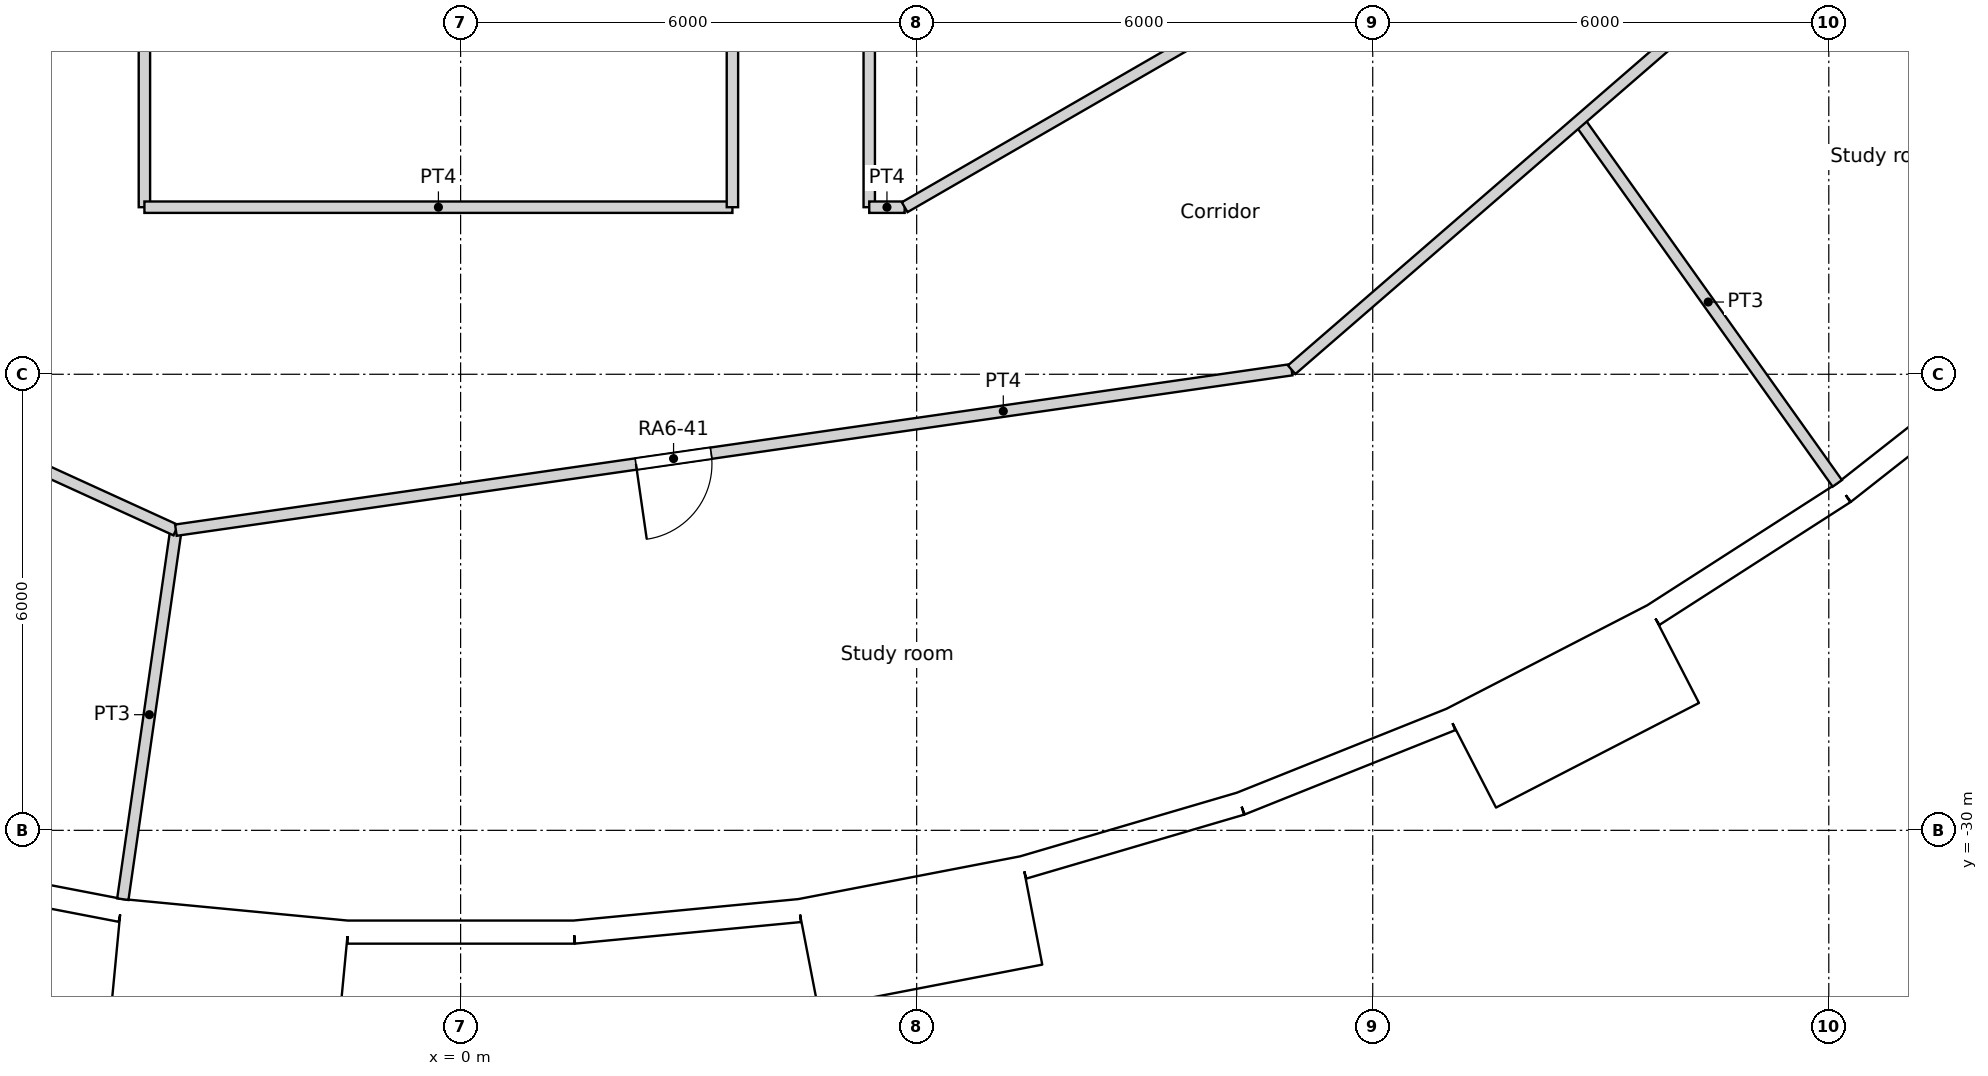
"""IFC4 building model, lengths in metres.
Left out: names, types, materials, properties, quantities, classifications, styles, units other than length and angle.
Written with IfcOpenShell. Run it as: python <this file> out.ifc"""

import sys

from ifc_helpers import new_model, si_unit, direction, frame, frame_2d, origin, origin_2d, place, context, subcontext, project, spatial, rectangle, circle, extrude, element, fill, save


model = new_model("IFC4")
c1 = context("Model", 3, precision=1e-05, world=origin(), true_north=direction((0.0, 1.0)))
c2 = subcontext(c1, "Body", "Model", "MODEL_VIEW")
j1 = project(units=[si_unit("LENGTHUNIT", "METRE"), si_unit("PLANEANGLEUNIT", "RADIAN")], contexts=[c1])
p1 = place(None, origin())
s1 = spatial("IfcSite", under=j1, at=p1, CompositionType="ELEMENT")
p2 = place(p1, origin())
s2 = spatial("IfcBuilding", under=s1, at=p2, CompositionType="ELEMENT")
p3 = place(p2, frame((0.0, 0.0, 82.2)))
s3 = spatial("IfcBuildingStorey", under=s2, at=p3, CompositionType="ELEMENT", Elevation=82.2)
for number, where, z_axis, x_axis in (
    (1, (-4.309, -29.966, 0.0), (0.0, 0.0, 1.0), (1.0, 0.0, 0.0)),
    (2, (1.44, -30.24, 0.0), (0.0, 0.0, 1.0), (1.0, 0.0, 0.0)),
    (3, (7.137, -29.421, 0.0), (0.0, 0.0, 1.0), (1.0, 0.0, 0.0)),
    (4, (12.576, -27.539, 0.0), (0.0, 0.0, 1.0), (1.0, 0.0, 0.0)),
    (5, (17.561, -24.661, 0.0), (0.0, 0.0, 1.0), (1.0, 0.0, 0.0)),
):
    element("IfcColumn", number, at=place(p3, frame(where, z_axis=z_axis, x_axis=x_axis)), inside=s3, PredefinedType="COLUMN", context=c2, shape_type="SweptSolid", body=[
        extrude(circle(Radius=0.6, at=origin_2d()), origin(), (0.0, 0.0, 1.0), 3.6),
    ])
for number, where, z_axis, x_axis in (
    (6, (-1.427, -24.506, 0.0), (0.0, 0.0, 1.0), (1.0, 0.0, 0.0)),
    (7, (4.263, -24.175, 0.0), (0.0, 0.0, 1.0), (1.0, 0.0, 0.0)),
    (8, (9.723, -22.54, 0.0), (0.0, 0.0, 1.0), (1.0, 0.0, 0.0)),
    (9, (14.659, -19.69, 0.0), (0.0, 0.0, 1.0), (1.0, 0.0, 0.0)),
):
    element("IfcColumn", number, at=place(p3, frame(where, z_axis=z_axis, x_axis=x_axis)), inside=s3, PredefinedType="COLUMN", context=c2, shape_type="SweptSolid", body=[
        extrude(circle(Radius=0.65, at=origin_2d()), origin(), (0.0, 0.0, 1.0), 3.6),
    ])
p4 = place(p3, frame((-7.397, -30.49, 0.0), z_axis=(0.0, 0.0, 1.0), x_axis=(0.981924535406, -0.189272836848, 0.0)))
e10 = element("IfcWall", 10, at=p4, inside=s3, PredefinedType="SOLIDWALL", context=c2, shape_type="SweptSolid", body=[
    extrude(rectangle(XDim=2.98, YDim=0.3, at=frame_2d((1.49, 0.0))), origin(), (0.0, 0.0, 1.0), 3.15),
])
p5 = place(p4, frame((1.49, 0.0, 1.55)))
e11 = element("IfcOpeningElement", 11, at=p5, cuts=e10, PredefinedType="OPENING", context=c2, shape_type="SweptSolid", body=[
    extrude(circle(Radius=0.9, at=origin_2d()), frame((0.0, 0.16, 0.0), z_axis=(0.0, -1.0, 0.0), x_axis=(1.0, 0.0, 0.0)), (0.0, 0.0, 1.0), 0.32),
])
p6 = place(p3, frame((-4.527, -31.627, -0.45), z_axis=(0.0, 0.0, 1.0), x_axis=(0.995472768558, -0.09504718333, 0.0)))
e12 = element("IfcWall", 12, at=p6, inside=s3, PredefinedType="ELEMENTEDWALL", context=c2, shape_type="SweptSolid", body=[
    extrude(rectangle(XDim=3.0, YDim=1.45, at=frame_2d((1.5, 0.0))), origin(), (0.0, 0.0, 1.0), 3.6),
])
p7 = place(p6, frame((1.5, 0.0, 2.0)))
e13 = element("IfcOpeningElement", 13, at=p7, cuts=e12, PredefinedType="OPENING", context=c2, shape_type="SweptSolid", body=[
    extrude(circle(Radius=0.9, at=origin_2d()), frame((0.0, 0.735, 0.0), z_axis=(0.0, -1.0, 0.0), x_axis=(1.0, 0.0, 0.0)), (0.0, 0.0, 1.0), 1.47),
])
p8 = place(p3, frame((-1.487, -31.339, 0.0), z_axis=(0.0, 0.0, 1.0), x_axis=(1.0, 0.0, 0.0)))
e14 = element("IfcWall", 14, at=p8, inside=s3, PredefinedType="SOLIDWALL", context=c2, shape_type="SweptSolid", body=[
    extrude(rectangle(XDim=2.98, YDim=0.3, at=frame_2d((1.49, 0.0))), origin(), (0.0, 0.0, 1.0), 3.15),
])
p9 = place(p8, frame((1.49, 0.0, 1.55)))
e15 = element("IfcOpeningElement", 15, at=p9, cuts=e14, PredefinedType="OPENING", context=c2, shape_type="SweptSolid", body=[
    extrude(circle(Radius=0.9, at=origin_2d()), frame((0.0, 0.16, 0.0), z_axis=(0.0, -1.0, 0.0), x_axis=(1.0, 0.0, 0.0)), (0.0, 0.0, 1.0), 0.32),
])
p10 = place(p3, frame((1.493, -31.339, 0.0), z_axis=(0.0, 0.0, 1.0), x_axis=(0.995472611385, 0.095048829468, 0.0)))
e16 = element("IfcWall", 16, at=p10, inside=s3, PredefinedType="SOLIDWALL", context=c2, shape_type="SweptSolid", body=[
    extrude(rectangle(XDim=2.979, YDim=0.3, at=frame_2d((1.49, 0.0))), origin(), (0.0, 0.0, 1.0), 3.15),
])
p11 = place(p10, frame((1.49, 0.0, 1.55)))
e17 = element("IfcOpeningElement", 17, at=p11, cuts=e16, PredefinedType="OPENING", context=c2, shape_type="SweptSolid", body=[
    extrude(circle(Radius=0.9, at=origin_2d()), frame((0.0, 0.16, 0.0), z_axis=(0.0, -1.0, 0.0), x_axis=(1.0, 0.0, 0.0)), (0.0, 0.0, 1.0), 0.32),
])
p12 = place(p3, frame((4.567, -31.621, -0.45), z_axis=(0.0, 0.0, 1.0), x_axis=(0.981921602273, 0.189288052949, 0.0)))
e18 = element("IfcWall", 18, at=p12, inside=s3, PredefinedType="ELEMENTEDWALL", context=c2, shape_type="SweptSolid", body=[
    extrude(rectangle(XDim=3.0, YDim=1.45, at=frame_2d((1.5, 0.0))), origin(), (0.0, 0.0, 1.0), 3.6),
])
p13 = place(p12, frame((1.5, 0.0, 2.0)))
e19 = element("IfcOpeningElement", 19, at=p13, cuts=e18, PredefinedType="OPENING", context=c2, shape_type="SweptSolid", body=[
    extrude(circle(Radius=0.9, at=origin_2d()), frame((0.0, 0.735, 0.0), z_axis=(0.0, -1.0, 0.0), x_axis=(1.0, 0.0, 0.0)), (0.0, 0.0, 1.0), 1.47),
])
p14 = place(p3, frame((7.403, -30.488, 0.0), z_axis=(0.0, 0.0, 1.0), x_axis=(0.959501085144, 0.281704930036, 0.0)))
e20 = element("IfcWall", 20, at=p14, inside=s3, PredefinedType="SOLIDWALL", context=c2, shape_type="SweptSolid", body=[
    extrude(rectangle(XDim=2.979, YDim=0.3, at=frame_2d((1.49, 0.0))), origin(), (0.0, 0.0, 1.0), 3.15),
])
p15 = place(p14, frame((1.49, 0.0, 1.55)))
e21 = element("IfcOpeningElement", 21, at=p15, cuts=e20, PredefinedType="OPENING", context=c2, shape_type="SweptSolid", body=[
    extrude(circle(Radius=0.9, at=origin_2d()), frame((0.0, 0.16, 0.0), z_axis=(0.0, -1.0, 0.0), x_axis=(1.0, 0.0, 0.0)), (0.0, 0.0, 1.0), 0.32),
])
p16 = place(p3, frame((10.261, -29.649, 0.0), z_axis=(0.0, 0.0, 1.0), x_axis=(0.928374947, 0.371644935098, 0.0)))
e22 = element("IfcWall", 22, at=p16, inside=s3, PredefinedType="SOLIDWALL", context=c2, shape_type="SweptSolid", body=[
    extrude(rectangle(XDim=2.98, YDim=0.3, at=frame_2d((1.49, 0.0))), origin(), (0.0, 0.0, 1.0), 3.15),
])
p17 = place(p16, frame((1.49, 0.0, 1.55)))
e23 = element("IfcOpeningElement", 23, at=p17, cuts=e22, PredefinedType="OPENING", context=c2, shape_type="SweptSolid", body=[
    extrude(circle(Radius=0.9, at=origin_2d()), frame((0.0, 0.16, 0.0), z_axis=(0.0, -1.0, 0.0), x_axis=(1.0, 0.0, 0.0)), (0.0, 0.0, 1.0), 0.32),
])
p18 = place(p3, frame((13.291, -29.053, -0.45), z_axis=(0.0, 0.0, 1.0), x_axis=(0.888858064689, 0.458182650083, 0.0)))
e24 = element("IfcWall", 24, at=p18, inside=s3, PredefinedType="ELEMENTEDWALL", context=c2, shape_type="SweptSolid", body=[
    extrude(rectangle(XDim=3.0, YDim=1.45, at=frame_2d((1.5, 0.0))), origin(), (0.0, 0.0, 1.0), 3.6),
])
p19 = place(p18, frame((1.5, 0.0, 2.0)))
e25 = element("IfcOpeningElement", 25, at=p19, cuts=e24, PredefinedType="OPENING", context=c2, shape_type="SweptSolid", body=[
    extrude(circle(Radius=0.9, at=origin_2d()), frame((0.0, 0.735, 0.0), z_axis=(0.0, -1.0, 0.0), x_axis=(1.0, 0.0, 0.0)), (0.0, 0.0, 1.0), 1.47),
])
p20 = place(p3, frame((15.692, -27.168, 0.0), z_axis=(0.0, 0.0, 1.0), x_axis=(0.841260995538, 0.54062920508, 0.0)))
e26 = element("IfcWall", 26, at=p20, inside=s3, PredefinedType="SOLIDWALL", context=c2, shape_type="SweptSolid", body=[
    extrude(rectangle(XDim=2.979, YDim=0.3, at=frame_2d((1.49, 0.0))), origin(), (0.0, 0.0, 1.0), 3.15),
])
p21 = place(p20, frame((1.49, 0.0, 1.55)))
e27 = element("IfcOpeningElement", 27, at=p21, cuts=e26, PredefinedType="OPENING", context=c2, shape_type="SweptSolid", body=[
    extrude(circle(Radius=0.9, at=origin_2d()), frame((0.0, 0.16, 0.0), z_axis=(0.0, -1.0, 0.0), x_axis=(1.0, 0.0, 0.0)), (0.0, 0.0, 1.0), 0.32),
])
p22 = place(p3, frame((18.199, -25.557, 0.0), z_axis=(0.0, 0.0, 1.0), x_axis=(0.786053834673, 0.618158045322, 0.0)))
e28 = element("IfcWall", 28, at=p22, inside=s3, PredefinedType="SOLIDWALL", context=c2, shape_type="SweptSolid", body=[
    extrude(rectangle(XDim=2.979, YDim=0.3, at=frame_2d((1.49, 0.0))), origin(), (0.0, 0.0, 1.0), 3.15),
])
p23 = place(p22, frame((1.49, 0.0, 1.55)))
e29 = element("IfcOpeningElement", 29, at=p23, cuts=e28, PredefinedType="OPENING", context=c2, shape_type="SweptSolid", body=[
    extrude(circle(Radius=0.9, at=origin_2d()), frame((0.0, 0.16, 0.0), z_axis=(0.0, -1.0, 0.0), x_axis=(1.0, 0.0, 0.0)), (0.0, 0.0, 1.0), 0.32),
])
p24 = place(p3, frame((10.933, -23.94, 0.0), z_axis=(0.0, 0.0, 1.0), x_axis=(0.755770011705, 0.654837147242, 0.0)))
e30 = element("IfcWall", 30, at=p24, inside=s3, PredefinedType="PARTITIONING", context=c2, shape_type="SweptSolid", body=[
    extrude(rectangle(XDim=14.83, YDim=0.15, at=frame_2d((7.415, 0.0))), origin(), (0.0, 0.0, 1.0), 3.15),
])
p25 = place(p3, frame((-4.16, -21.802, 0.0), z_axis=(0.0, 0.0, 1.0), x_axis=(0.0, 1.0, 0.0)))
e31 = element("IfcWall", 31, at=p25, inside=s3, PredefinedType="PARTITIONING", context=c2, shape_type="SweptSolid", body=[
    extrude(rectangle(XDim=10.002, YDim=0.15, at=frame_2d((5.001, 0.0))), origin(), (0.0, 0.0, 1.0), 3.15),
])
p26 = place(p25, frame((4.776, 0.0, 0.0)))
e32 = element("IfcOpeningElement", 32, at=p26, cuts=e31, PredefinedType="OPENING", context=c2, shape_type="SweptSolid", body=[
    extrude(rectangle(XDim=0.95, YDim=2.1, at=frame_2d((0.475, 1.05))), frame((0.0, 0.075, 0.0), z_axis=(0.0, -1.0, 0.0), x_axis=(1.0, 0.0, 0.0)), (0.0, 0.0, 1.0), 0.15),
])
p27 = place(p3, frame((-4.16, -21.802, 0.0), z_axis=(0.0, 0.0, 1.0), x_axis=(1.0, 0.0, 0.0)))
e33 = element("IfcWall", 33, at=p27, inside=s3, PredefinedType="PARTITIONING", context=c2, shape_type="SweptSolid", body=[
    extrude(rectangle(XDim=7.736, YDim=0.15, at=frame_2d((3.868, 0.0))), origin(), (0.0, 0.0, 1.0), 3.15),
])
for number, where, z_axis, x_axis in (
    (34, (3.576, -21.802, 0.0), (0.0, 0.0, 1.0), (0.0, 1.0, 0.0)),
    (35, (5.376, -21.802, 0.0), (0.0, 0.0, 1.0), (0.0, 1.0, 0.0)),
):
    element("IfcWall", number, at=place(p3, frame(where, z_axis=z_axis, x_axis=x_axis)), inside=s3, PredefinedType="PARTITIONING", context=c2, shape_type="SweptSolid", body=[
        extrude(rectangle(XDim=10.002, YDim=0.15, at=frame_2d((5.001, 0.0))), origin(), (0.0, 0.0, 1.0), 3.15),
    ])
p28 = place(p3, frame((5.376, -21.802, 0.0), z_axis=(0.0, 0.0, 1.0), x_axis=(1.0, 0.0, 0.0)))
e36 = element("IfcWall", 36, at=p28, inside=s3, PredefinedType="PARTITIONING", context=c2, shape_type="SweptSolid", body=[
    extrude(rectangle(XDim=0.466, YDim=0.15, at=frame_2d((0.233, 0.0))), origin(), (0.0, 0.0, 1.0), 3.15),
])
p29 = place(p3, frame((5.842, -21.802, 0.0), z_axis=(0.0, 0.0, 1.0), x_axis=(0.866031778836, 0.499988957924, 0.0)))
e37 = element("IfcWall", 37, at=p29, inside=s3, PredefinedType="PARTITIONING", context=c2, shape_type="SweptSolid", body=[
    extrude(rectangle(XDim=11.683, YDim=0.15, at=frame_2d((5.842, 0.0))), origin(), (0.0, 0.0, 1.0), 3.15),
])
p30 = place(p29, frame((5.274, 0.0, 0.0)))
e38 = element("IfcOpeningElement", 38, at=p30, cuts=e37, PredefinedType="OPENING", context=c2, shape_type="SweptSolid", body=[
    extrude(rectangle(XDim=0.95, YDim=2.1, at=frame_2d((0.475, 1.05))), frame((0.0, 0.075, 0.0), z_axis=(0.0, -1.0, 0.0), x_axis=(1.0, 0.0, 0.0)), (0.0, 0.0, 1.0), 0.15),
])
p31 = place(p3, frame((-17.235, -19.89, 0.0), z_axis=(0.0, 0.0, 1.0), x_axis=(0.90960889055, -0.415465601743, 0.0)))
e39 = element("IfcWall", 39, at=p31, inside=s3, PredefinedType="PARTITIONING", context=c2, shape_type="SweptSolid", body=[
    extrude(rectangle(XDim=14.829, YDim=0.15, at=frame_2d((7.415, 0.0))), origin(), (0.0, 0.0, 1.0), 3.15),
])
p32 = place(p31, frame((6.914, 0.0, 0.0)))
e40 = element("IfcOpeningElement", 40, at=p32, cuts=e39, PredefinedType="OPENING", context=c2, shape_type="SweptSolid", body=[
    extrude(rectangle(XDim=1.0, YDim=2.04, at=frame_2d((0.5, 1.02))), frame((0.0, 0.075, 0.0), z_axis=(0.0, -1.0, 0.0), x_axis=(1.0, 0.0, 0.0)), (0.0, 0.0, 1.0), 0.15),
])
p33 = place(p3, frame((-3.746, -26.051, 0.0), z_axis=(0.0, 0.0, 1.0), x_axis=(0.98981637125, 0.142350100825, 0.0)))
e41 = element("IfcWall", 41, at=p33, inside=s3, PredefinedType="PARTITIONING", context=c2, shape_type="SweptSolid", body=[
    extrude(rectangle(XDim=14.83, YDim=0.15, at=frame_2d((7.415, 0.0))), origin(), (0.0, 0.0, 1.0), 3.15),
])
p34 = place(p33, frame((6.115, 0.0, 0.0)))
e42 = element("IfcOpeningElement", 42, at=p34, cuts=e41, PredefinedType="OPENING", context=c2, shape_type="SweptSolid", body=[
    extrude(rectangle(XDim=1.0, YDim=2.04, at=frame_2d((0.5, 1.02))), frame((0.0, 0.075, 0.0), z_axis=(0.0, -1.0, 0.0), x_axis=(1.0, 0.0, 0.0)), (0.0, 0.0, 1.0), 0.15),
])
p35 = place(p3, frame((-4.444, -30.906, 0.0), z_axis=(0.0, 0.0, 1.0), x_axis=(0.142306296561, 0.989822669956, 0.0)))
e43 = element("IfcWall", 43, at=p35, inside=s3, PredefinedType="PARTITIONING", context=c2, shape_type="SweptSolid", body=[
    extrude(rectangle(XDim=4.905, YDim=0.15, at=frame_2d((2.452, 0.0))), origin(), (0.0, 0.0, 1.0), 3.15),
])
p36 = place(p3, frame((14.715, -20.664, 0.0), z_axis=(0.0, 0.0, 1.0), x_axis=(0.580007254017, -0.814611309329, 0.0)))
e44 = element("IfcWall", 44, at=p36, inside=s3, PredefinedType="PARTITIONING", context=c2, shape_type="SweptSolid", body=[
    extrude(rectangle(XDim=5.857, YDim=0.15, at=frame_2d((2.928, 0.0))), origin(), (0.0, 0.0, 1.0), 3.15),
])
p37 = place(p5, origin())
e45 = element("IfcWindow", 45, at=p37, inside=s3, PartitioningType="SINGLE_PANEL", PredefinedType="WINDOW", context=c2, shape_type="SweptSolid", body=[
    extrude(circle(Radius=0.9, at=origin_2d()), frame((0.0, 0.12, 0.0), z_axis=(0.0, -1.0, 0.0), x_axis=(1.0, 0.0, 0.0)), (0.0, 0.0, 1.0), 0.1),
])
fill(e11, e45)
p38 = place(p7, origin())
e46 = element("IfcWindow", 46, at=p38, inside=s3, PartitioningType="SINGLE_PANEL", PredefinedType="WINDOW", context=c2, shape_type="SweptSolid", body=[
    extrude(circle(Radius=0.9, at=origin_2d()), frame((0.0, 0.695, 0.0), z_axis=(0.0, -1.0, 0.0), x_axis=(1.0, 0.0, 0.0)), (0.0, 0.0, 1.0), 0.1),
])
fill(e13, e46)
p39 = place(p9, origin())
e47 = element("IfcWindow", 47, at=p39, inside=s3, PartitioningType="SINGLE_PANEL", PredefinedType="WINDOW", context=c2, shape_type="SweptSolid", body=[
    extrude(circle(Radius=0.9, at=origin_2d()), frame((0.0, 0.12, 0.0), z_axis=(0.0, -1.0, 0.0), x_axis=(1.0, 0.0, 0.0)), (0.0, 0.0, 1.0), 0.1),
])
fill(e15, e47)
p40 = place(p11, origin())
e48 = element("IfcWindow", 48, at=p40, inside=s3, PartitioningType="SINGLE_PANEL", PredefinedType="WINDOW", context=c2, shape_type="SweptSolid", body=[
    extrude(circle(Radius=0.9, at=origin_2d()), frame((0.0, 0.12, 0.0), z_axis=(0.0, -1.0, 0.0), x_axis=(1.0, 0.0, 0.0)), (0.0, 0.0, 1.0), 0.1),
])
fill(e17, e48)
p41 = place(p13, origin())
e49 = element("IfcWindow", 49, at=p41, inside=s3, PartitioningType="SINGLE_PANEL", PredefinedType="WINDOW", context=c2, shape_type="SweptSolid", body=[
    extrude(circle(Radius=0.9, at=origin_2d()), frame((0.0, 0.695, 0.0), z_axis=(0.0, -1.0, 0.0), x_axis=(1.0, 0.0, 0.0)), (0.0, 0.0, 1.0), 0.1),
])
fill(e19, e49)
p42 = place(p15, origin())
e50 = element("IfcWindow", 50, at=p42, inside=s3, PartitioningType="SINGLE_PANEL", PredefinedType="WINDOW", context=c2, shape_type="SweptSolid", body=[
    extrude(circle(Radius=0.9, at=origin_2d()), frame((0.0, 0.12, 0.0), z_axis=(0.0, -1.0, 0.0), x_axis=(1.0, 0.0, 0.0)), (0.0, 0.0, 1.0), 0.1),
])
fill(e21, e50)
p43 = place(p17, origin())
e51 = element("IfcWindow", 51, at=p43, inside=s3, PartitioningType="SINGLE_PANEL", PredefinedType="WINDOW", context=c2, shape_type="SweptSolid", body=[
    extrude(circle(Radius=0.9, at=origin_2d()), frame((0.0, 0.12, 0.0), z_axis=(0.0, -1.0, 0.0), x_axis=(1.0, 0.0, 0.0)), (0.0, 0.0, 1.0), 0.1),
])
fill(e23, e51)
p44 = place(p19, origin())
e52 = element("IfcWindow", 52, at=p44, inside=s3, PartitioningType="SINGLE_PANEL", PredefinedType="WINDOW", context=c2, shape_type="SweptSolid", body=[
    extrude(circle(Radius=0.9, at=origin_2d()), frame((0.0, 0.695, 0.0), z_axis=(0.0, -1.0, 0.0), x_axis=(1.0, 0.0, 0.0)), (0.0, 0.0, 1.0), 0.1),
])
fill(e25, e52)
p45 = place(p21, origin())
e53 = element("IfcWindow", 53, at=p45, inside=s3, PartitioningType="SINGLE_PANEL", PredefinedType="WINDOW", context=c2, shape_type="SweptSolid", body=[
    extrude(circle(Radius=0.9, at=origin_2d()), frame((0.0, 0.12, 0.0), z_axis=(0.0, -1.0, 0.0), x_axis=(1.0, 0.0, 0.0)), (0.0, 0.0, 1.0), 0.1),
])
fill(e27, e53)
p46 = place(p23, origin())
e54 = element("IfcWindow", 54, at=p46, inside=s3, PartitioningType="SINGLE_PANEL", PredefinedType="WINDOW", context=c2, shape_type="SweptSolid", body=[
    extrude(circle(Radius=0.9, at=origin_2d()), frame((0.0, 0.12, 0.0), z_axis=(0.0, -1.0, 0.0), x_axis=(1.0, 0.0, 0.0)), (0.0, 0.0, 1.0), 0.1),
])
fill(e29, e54)
p47 = place(p34, origin())
e55 = element("IfcDoor", 55, at=p47, inside=s3, OperationType="SINGLE_SWING_RIGHT", PredefinedType="DOOR", context=c2, shape_type="SweptSolid", body=[
    extrude(rectangle(XDim=1.0, YDim=2.04, at=frame_2d((0.5, 1.02))), frame((0.0, 0.025, 0.0), z_axis=(0.0, -1.0, 0.0), x_axis=(1.0, 0.0, 0.0)), (0.0, 0.0, 1.0), 0.05),
])
fill(e42, e55)
save(model, sys.argv[1])
